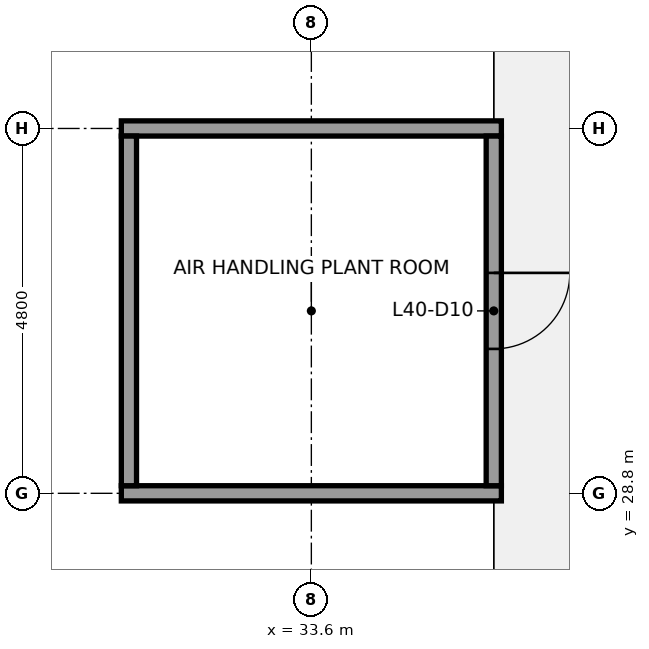
"""IFC4 building model, lengths in metres.
Left out: names, types, materials, properties, quantities, classifications, styles, units other than length and angle.
Written with IfcOpenShell. Run it as: python <this file> out.ifc"""

import sys

from ifc_helpers import new_model, si_unit, direction, frame, frame_2d, origin, place, context, subcontext, project, spatial, rectangle, extrude, element, fill, save


model = new_model("IFC4")
c1 = context("Model", 3, precision=1e-05, world=origin(), true_north=direction((0.0, 1.0)))
c2 = subcontext(c1, "Body", "Model", "MODEL_VIEW")
j1 = project(units=[si_unit("LENGTHUNIT", "METRE"), si_unit("PLANEANGLEUNIT", "RADIAN")], contexts=[c1])
p1 = place(None, origin())
s1 = spatial("IfcSite", under=j1, at=p1, CompositionType="ELEMENT")
p2 = place(p1, origin())
s2 = spatial("IfcBuilding", under=s1, at=p2, CompositionType="ELEMENT")
p3 = place(p2, frame((0.0, 0.0, 180.6)))
s3 = spatial("IfcBuildingStorey", under=s2, at=p3, CompositionType="ELEMENT", Elevation=180.6)
for number, where, z_axis, x_axis in (
    (1, (31.1, 28.8, 0.0), (0.0, 0.0, 1.0), (1.0, 0.0, 0.0)),
    (2, (31.1, 33.6, 0.0), (0.0, 0.0, 1.0), (1.0, 0.0, 0.0)),
):
    element("IfcWall", number, at=place(p3, frame(where, z_axis=z_axis, x_axis=x_axis)), inside=s3, PredefinedType="PARTITIONING", context=c2, shape_type="SweptSolid", body=[
        extrude(rectangle(XDim=5.0, YDim=0.2, at=frame_2d((2.5, 0.0))), origin(), (0.0, 0.0, 1.0), 11.309),
    ])
p4 = place(p3, frame((31.2, 28.9, 0.0), z_axis=(0.0, 0.0, 1.0), x_axis=(0.0, 1.0, 0.0)))
e3 = element("IfcWall", 3, at=p4, inside=s3, PredefinedType="PARTITIONING", context=c2, shape_type="SweptSolid", body=[
    extrude(rectangle(XDim=4.6, YDim=0.2, at=frame_2d((2.3, 0.0))), origin(), (0.0, 0.0, 1.0), 11.309),
])
p5 = place(p3, frame((36.0, 28.9, 0.0), z_axis=(0.0, 0.0, 1.0), x_axis=(0.0, 1.0, 0.0)))
e4 = element("IfcWall", 4, at=p5, inside=s3, PredefinedType="PARTITIONING", context=c2, shape_type="SweptSolid", body=[
    extrude(rectangle(XDim=4.6, YDim=0.2, at=frame_2d((2.3, 0.0))), origin(), (0.0, 0.0, 1.0), 11.309),
])
p6 = place(p5, frame((1.8, 0.0, 0.0)))
e5 = element("IfcOpeningElement", 5, at=p6, cuts=e4, PredefinedType="OPENING", context=c2, shape_type="SweptSolid", body=[
    extrude(rectangle(XDim=1.0, YDim=2.1, at=frame_2d((0.5, 1.05))), frame((0.0, 0.11, 0.0), z_axis=(0.0, -1.0, 0.0), x_axis=(1.0, 0.0, 0.0)), (0.0, 0.0, 1.0), 0.22),
])
p7 = place(p6, origin())
e6 = element("IfcDoor", 6, at=p7, inside=s3, OperationType="SINGLE_SWING_RIGHT", PredefinedType="DOOR", context=c2, shape_type="SweptSolid", body=[
    extrude(rectangle(XDim=1.0, YDim=2.1, at=frame_2d((0.5, 1.05))), frame((0.0, 0.025, 0.0), z_axis=(0.0, -1.0, 0.0), x_axis=(1.0, 0.0, 0.0)), (0.0, 0.0, 1.0), 0.05),
])
fill(e5, e6)
save(model, sys.argv[1])
